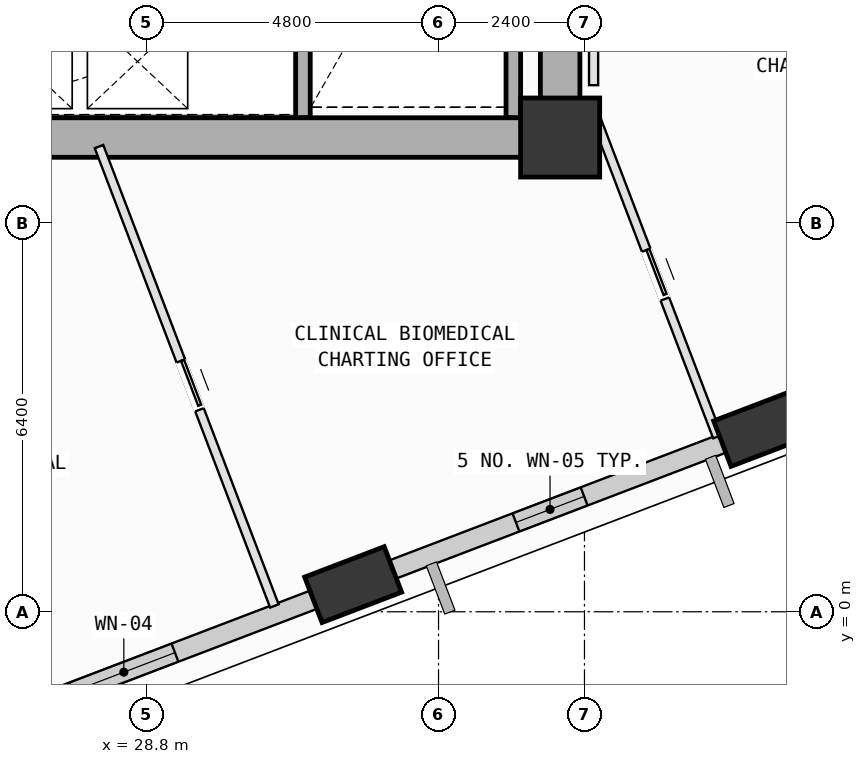
"""IFC4 building model, lengths in metres.
Left out: names, types, materials, properties, quantities, classifications, styles, units other than length and angle.
Written with IfcOpenShell. Run it as: python <this file> out.ifc"""

import sys

from ifc_helpers import new_model, si_unit, direction, frame, frame_2d, origin, origin_2d, place, context, subcontext, project, spatial, rectangle, extrude, element, fill, save


model = new_model("IFC4")
c1 = context("Model", 3, precision=1e-05, world=origin(), true_north=direction((0.0, 1.0)))
c2 = subcontext(c1, "Body", "Model", "MODEL_VIEW")
j1 = project(units=[si_unit("LENGTHUNIT", "METRE"), si_unit("PLANEANGLEUNIT", "RADIAN")], contexts=[c1])
p1 = place(None, origin())
s1 = spatial("IfcSite", under=j1, at=p1, CompositionType="ELEMENT")
p2 = place(p1, origin())
s2 = spatial("IfcBuilding", under=s1, at=p2, CompositionType="ELEMENT")
p3 = place(p2, frame((0.0, 0.0, 112.4)))
s3 = spatial("IfcBuildingStorey", under=s2, at=p3, CompositionType="ELEMENT", Elevation=112.4)
p4 = place(p3, frame((35.6, 7.8, 0.0), z_axis=(0.0, 0.0, 1.0), x_axis=(1.0, 0.0, 0.0)))
e1 = element("IfcColumn", 1, at=p4, inside=s3, PredefinedType="COLUMN", context=c2, shape_type="SweptSolid", body=[
    extrude(rectangle(XDim=1.3, YDim=1.3, at=origin_2d()), origin(), (0.0, 0.0, 1.0), 4.0),
])
p5 = place(p3, frame((32.196, 0.447, 0.002), z_axis=(0.100471354658, -0.004923278722, 0.994927770353), x_axis=(-0.308780331576, 0.950456194039, 0.035884955697)))
e2 = element("IfcColumn", 2, at=p5, inside=s3, PredefinedType="COLUMN", context=c2, shape_type="SweptSolid", body=[
    extrude(rectangle(XDim=1.4, YDim=0.8, at=origin_2d()), origin(), (0.0, 0.0, 1.0), 4.017),
])
p6 = place(p3, frame((38.922, 3.015, 0.002), z_axis=(0.089722632167, 0.02268918088, 0.995708315898), x_axis=(-0.573399819139, 0.818610197095, 0.033015036332)))
e3 = element("IfcColumn", 3, at=p6, inside=s3, PredefinedType="COLUMN", context=c2, shape_type="SweptSolid", body=[
    extrude(rectangle(XDim=1.4, YDim=0.8, at=origin_2d()), origin(), (0.0, 0.0, 1.0), 4.014),
])
p7 = place(p3, frame((31.911, 0.338, 0.0), z_axis=(0.0, 0.0, 1.0), x_axis=(-0.934208894776, -0.356726423077, 0.0)))
e4 = element("IfcWall", 4, at=p7, inside=s3, PredefinedType="SOLIDWALL", context=c2, shape_type="SweptSolid", body=[
    extrude(rectangle(XDim=6.234, YDim=0.32, at=frame_2d((3.117, 0.0))), origin(), (0.0, 0.0, 1.0), 3.165),
])
p8 = place(p7, frame((2.833, 0.0, 0.75)))
e5 = element("IfcOpeningElement", 5, at=p8, cuts=e4, PredefinedType="OPENING", context=c2, shape_type="SweptSolid", body=[
    extrude(rectangle(XDim=1.8, YDim=2.05, at=frame_2d((0.9, 1.025))), frame((0.0, 0.17, 0.0), z_axis=(0.0, -1.0, 0.0), x_axis=(1.0, 0.0, 0.0)), (0.0, 0.0, 1.0), 0.34),
])
p9 = place(p3, frame((38.631, 2.904, 0.0), z_axis=(0.0, 0.0, 1.0), x_axis=(-0.93420862639, -0.356727125936, 0.0)))
e6 = element("IfcWall", 6, at=p9, inside=s3, PredefinedType="SOLIDWALL", context=c2, shape_type="SweptSolid", body=[
    extrude(rectangle(XDim=6.214, YDim=0.32, at=frame_2d((3.107, 0.0))), origin(), (0.0, 0.0, 1.0), 3.165),
])
p10 = place(p9, frame((2.823, 0.0, 0.75)))
e7 = element("IfcOpeningElement", 7, at=p10, cuts=e6, PredefinedType="OPENING", context=c2, shape_type="SweptSolid", body=[
    extrude(rectangle(XDim=1.2, YDim=1.75, at=frame_2d((0.6, 0.875))), frame((0.0, 0.17, 0.0), z_axis=(0.0, -1.0, 0.0), x_axis=(1.0, 0.0, 0.0)), (0.0, 0.0, 1.0), 0.34),
])
for number, where, z_axis, x_axis in (
    (8, (34.83, 15.12, 0.0), (0.0, 0.0, 1.0), (0.0, -1.0, 0.0)),
    (9, (31.37, 8.125, 0.0), (0.0, 0.0, 1.0), (0.0, 1.0, 0.0)),
):
    element("IfcWall", number, at=place(p3, frame(where, z_axis=z_axis, x_axis=x_axis)), inside=s3, PredefinedType="SOLIDWALL", context=c2, shape_type="SweptSolid", body=[
        extrude(rectangle(XDim=6.995, YDim=0.24, at=frame_2d((3.498, 0.0))), origin(), (0.0, 0.0, 1.0), 3.78),
    ])
p11 = place(p3, frame((24.8, 7.8, 0.0), z_axis=(0.0, 0.0, 1.0), x_axis=(1.0, 0.0, 0.0)))
e10 = element("IfcWall", 10, at=p11, inside=s3, PredefinedType="SHEAR", context=c2, shape_type="SweptSolid", body=[
    extrude(rectangle(XDim=10.8, YDim=0.65, at=frame_2d((5.4, 0.0))), origin(), (0.0, 0.0, 1.0), 3.78),
])
p12 = place(p3, frame((35.6, 7.8, 0.0), z_axis=(0.0, 0.0, 1.0), x_axis=(0.0, 1.0, 0.0)))
e11 = element("IfcWall", 11, at=p12, inside=s3, PredefinedType="SHEAR", context=c2, shape_type="SweptSolid", body=[
    extrude(rectangle(XDim=9.0, YDim=0.65, at=frame_2d((4.5, 0.0))), origin(), (0.0, 0.0, 1.0), 3.78),
])
p13 = place(p3, frame((28.016, 7.651, 0.0), z_axis=(0.0, 0.0, 1.0), x_axis=(0.356612934279, -0.934252222424, 0.0)))
e12 = element("IfcWall", 12, at=p13, inside=s3, PredefinedType="PARTITIONING", context=c2, shape_type="SweptSolid", body=[
    extrude(rectangle(XDim=8.087, YDim=0.15, at=frame_2d((4.043, 0.0))), origin(), (0.0, 0.0, 1.0), 3.78),
])
p14 = place(p13, frame((3.774, 0.0, 0.0)))
e13 = element("IfcOpeningElement", 13, at=p14, cuts=e12, PredefinedType="OPENING", context=c2, shape_type="SweptSolid", body=[
    extrude(rectangle(XDim=0.86, YDim=2.06, at=frame_2d((0.43, 1.03))), frame((0.0, 0.085, 0.0), z_axis=(0.0, -1.0, 0.0), x_axis=(1.0, 0.0, 0.0)), (0.0, 0.0, 1.0), 0.17),
])
p15 = place(p3, frame((36.15, 8.213, 0.0), z_axis=(0.0, 0.0, 1.0), x_axis=(0.356777557766, -0.934189367459, 0.0)))
e14 = element("IfcWall", 14, at=p15, inside=s3, PredefinedType="PARTITIONING", context=c2, shape_type="SweptSolid", body=[
    extrude(rectangle(XDim=5.71, YDim=0.15, at=frame_2d((2.855, 0.0))), origin(), (0.0, 0.0, 1.0), 3.78),
])
p16 = place(p15, frame((2.425, 0.0, 0.0)))
e15 = element("IfcOpeningElement", 15, at=p16, cuts=e14, PredefinedType="OPENING", context=c2, shape_type="SweptSolid", body=[
    extrude(rectangle(XDim=0.86, YDim=2.06, at=frame_2d((0.43, 1.03))), frame((0.0, 0.085, 0.0), z_axis=(0.0, -1.0, 0.0), x_axis=(1.0, 0.0, 0.0)), (0.0, 0.0, 1.0), 0.17),
])
p17 = place(p3, frame((32.908, 0.473, 0.0), z_axis=(0.0, 0.0, 1.0), x_axis=(-0.934056725014, -0.357124676346, 0.0)))
e16 = element("IfcWall", 16, at=p17, inside=s3, PredefinedType="PARTITIONING", context=c2, shape_type="SweptSolid", body=[
    extrude(rectangle(XDim=0.98, YDim=0.15, at=frame_2d((0.49, 0.0))), origin(), (0.0, 0.0, 1.0), 3.165),
])
p18 = place(p3, frame((35.6, 7.5, 0.0), z_axis=(0.0, 0.0, 1.0), x_axis=(1.0, 0.0, 0.0)))
e17 = element("IfcWall", 17, at=p18, inside=s3, PredefinedType="PARTITIONING", context=c2, shape_type="SweptSolid", body=[
    extrude(rectangle(XDim=0.55, YDim=0.15, at=frame_2d((0.275, 0.0))), origin(), (0.0, 0.0, 1.0), 2.965),
])
p19 = place(p3, frame((39.639, 3.043, 0.0), z_axis=(0.0, 0.0, 1.0), x_axis=(-0.934073578561, -0.357080592912, 0.0)))
e18 = element("IfcWall", 18, at=p19, inside=s3, PredefinedType="PARTITIONING", context=c2, shape_type="SweptSolid", body=[
    extrude(rectangle(XDim=0.991, YDim=0.15, at=frame_2d((0.496, 0.0))), origin(), (0.0, 0.0, 1.0), 3.165),
])
p20 = place(p3, frame((36.15, 8.661, 0.0), z_axis=(0.0, 0.0, 1.0), x_axis=(0.0, 1.0, 0.0)))
e19 = element("IfcWall", 19, at=p20, inside=s3, PredefinedType="PARTITIONING", context=c2, shape_type="SweptSolid", body=[
    extrude(rectangle(XDim=7.679, YDim=0.15, at=frame_2d((3.84, 0.0))), origin(), (0.0, 0.0, 1.0), 3.78),
])
p21 = place(p8, origin())
e20 = element("IfcWindow", 20, at=p21, inside=s3, PartitioningType="SINGLE_PANEL", PredefinedType="WINDOW", context=c2, shape_type="SweptSolid", body=[
    extrude(rectangle(XDim=1.8, YDim=2.05, at=frame_2d((0.9, 1.025))), frame((0.0, 0.03, 0.0), z_axis=(0.0, -1.0, 0.0), x_axis=(1.0, 0.0, 0.0)), (0.0, 0.0, 1.0), 0.06),
])
fill(e5, e20)
p22 = place(p10, origin())
e21 = element("IfcWindow", 21, at=p22, inside=s3, PartitioningType="SINGLE_PANEL", PredefinedType="WINDOW", context=c2, shape_type="SweptSolid", body=[
    extrude(rectangle(XDim=1.2, YDim=1.75, at=frame_2d((0.6, 0.875))), frame((0.0, 0.03, 0.0), z_axis=(0.0, -1.0, 0.0), x_axis=(1.0, 0.0, 0.0)), (0.0, 0.0, 1.0), 0.06),
])
fill(e7, e21)
p23 = place(p16, origin())
e22 = element("IfcDoor", 22, at=p23, inside=s3, OperationType="SLIDING_TO_LEFT", PredefinedType="DOOR", context=c2, shape_type="SweptSolid", body=[
    extrude(rectangle(XDim=0.86, YDim=2.06, at=frame_2d((0.43, 1.03))), frame((0.0, 0.025, 0.0), z_axis=(0.0, -1.0, 0.0), x_axis=(1.0, 0.0, 0.0)), (0.0, 0.0, 1.0), 0.05),
])
fill(e15, e22)
p24 = place(p14, origin())
e23 = element("IfcDoor", 23, at=p24, inside=s3, OperationType="SLIDING_TO_LEFT", PredefinedType="DOOR", context=c2, shape_type="SweptSolid", body=[
    extrude(rectangle(XDim=0.86, YDim=2.06, at=frame_2d((0.43, 1.03))), frame((0.0, 0.025, 0.0), z_axis=(0.0, -1.0, 0.0), x_axis=(1.0, 0.0, 0.0)), (0.0, 0.0, 1.0), 0.05),
])
fill(e13, e23)
save(model, sys.argv[1])
